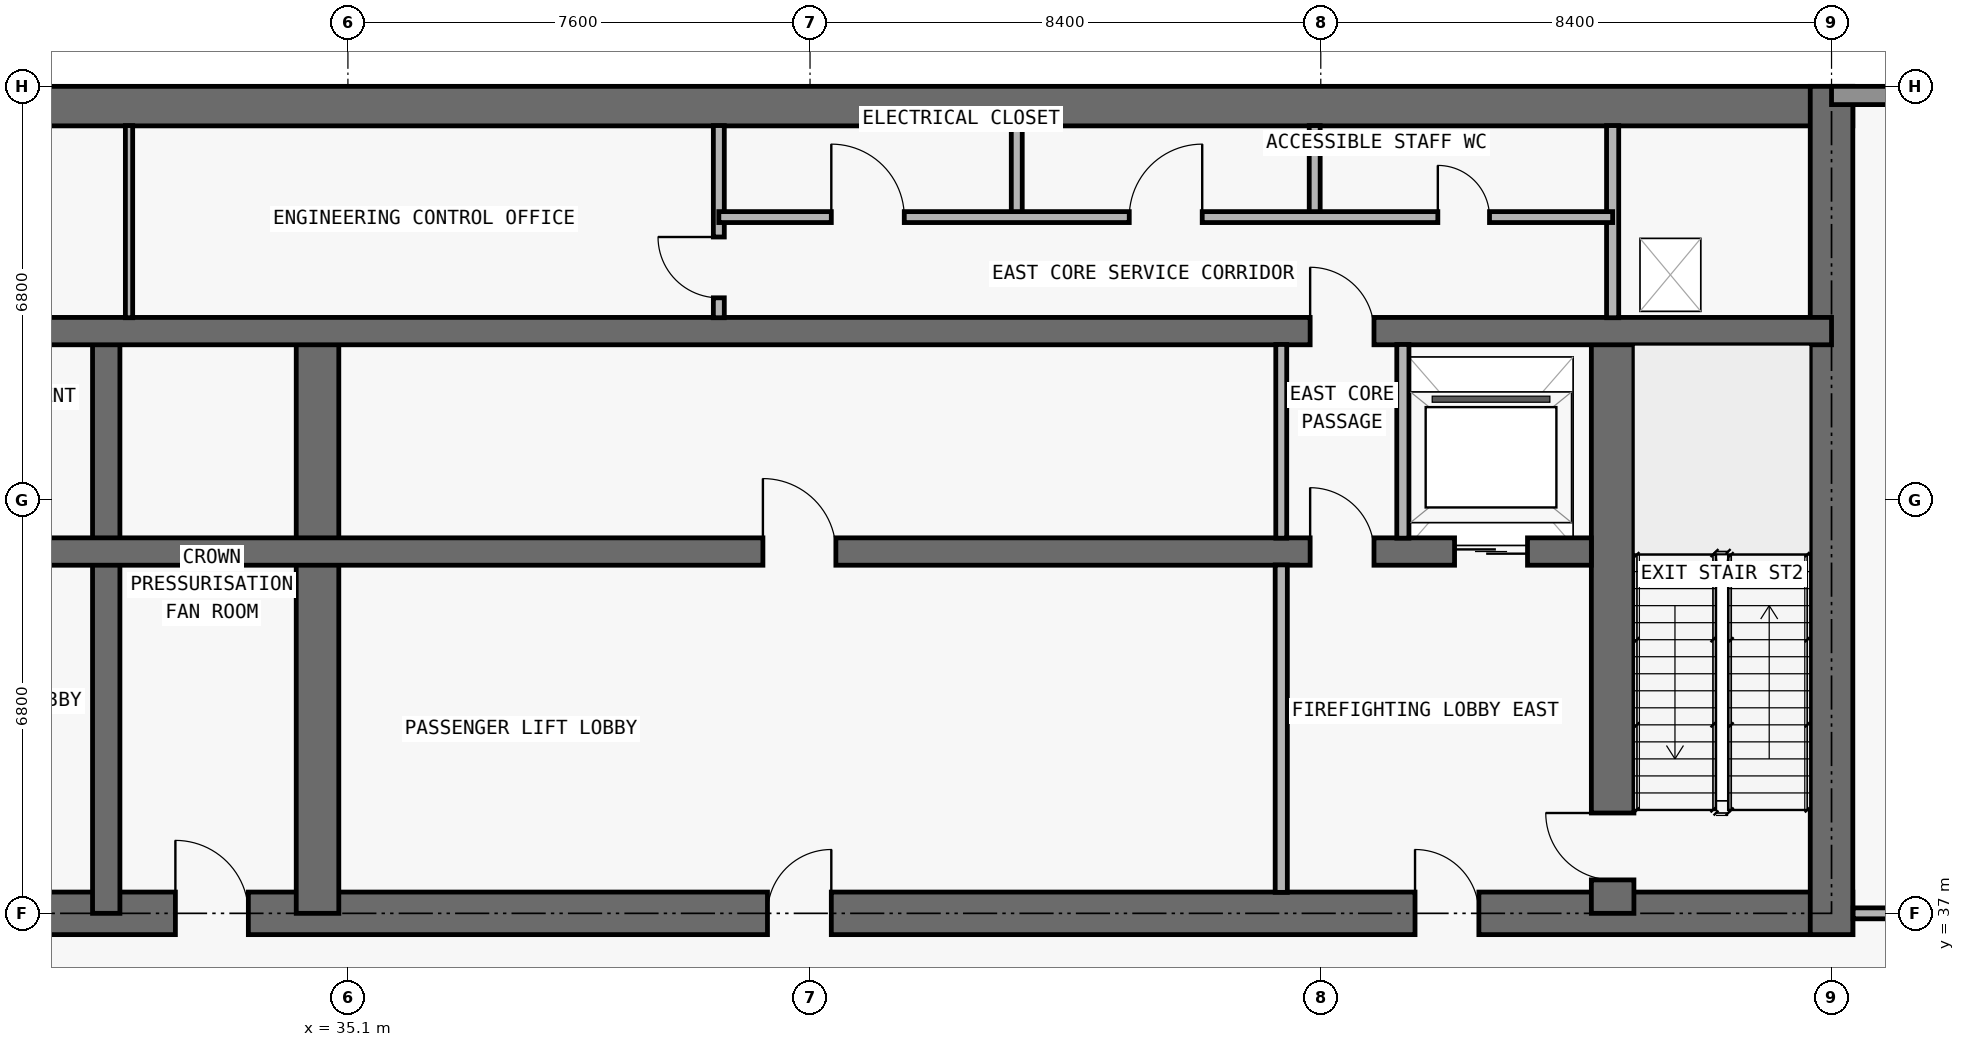
"""IFC4 building model, lengths in metres.
Left out: names, types, materials, properties, quantities, classifications, styles, units other than length and angle.
Written with IfcOpenShell. Run it as: python <this file> out.ifc"""

import sys

from ifc_helpers import new_model, si_unit, direction, frame, frame_2d, origin, place, context, subcontext, project, spatial, rectangle, extrude, element, fill, save


model = new_model("IFC4")
c1 = context("Model", 3, precision=1e-05, world=origin(), true_north=direction((0.0, 1.0)))
c2 = subcontext(c1, "Body", "Model", "MODEL_VIEW")
j1 = project(units=[si_unit("LENGTHUNIT", "METRE"), si_unit("PLANEANGLEUNIT", "RADIAN")], contexts=[c1])
p1 = place(None, origin())
s1 = spatial("IfcSite", under=j1, at=p1, CompositionType="ELEMENT")
p2 = place(p1, origin())
s2 = spatial("IfcBuilding", under=s1, at=p2, CompositionType="ELEMENT")
p3 = place(p2, frame((0.0, 0.0, 290.2)))
s3 = spatial("IfcBuildingStorey", under=s2, at=p3, CompositionType="ELEMENT", Elevation=290.2)
p4 = place(p3, frame((17.95, 37.0, 0.0), z_axis=(0.0, 0.0, 1.0), x_axis=(1.0, 0.0, 0.0)))
e1 = element("IfcWall", 1, at=p4, inside=s3, PredefinedType="SHEAR", context=c2, shape_type="SweptSolid", body=[
    extrude(rectangle(XDim=41.9, YDim=0.7, at=frame_2d((20.95, 0.0))), origin(), (0.0, 0.0, 1.0), 5.1),
])
p5 = place(p4, frame((14.312, 0.0, 0.0)))
e2 = element("IfcOpeningElement", 2, at=p5, cuts=e1, PredefinedType="OPENING", context=c2, shape_type="SweptSolid", body=[
    extrude(rectangle(XDim=1.2, YDim=2.2, at=frame_2d((0.6, 1.1))), frame((0.0, 0.36, 0.0), z_axis=(0.0, -1.0, 0.0), x_axis=(1.0, 0.0, 0.0)), (0.0, 0.0, 1.0), 0.72),
])
p6 = place(p4, frame((6.2, 0.0, 0.0)))
e3 = element("IfcOpeningElement", 3, at=p6, cuts=e1, PredefinedType="OPENING", context=c2, shape_type="SweptSolid", body=[
    extrude(rectangle(XDim=1.05, YDim=2.15, at=frame_2d((0.525, 1.075))), frame((0.0, 0.36, 0.0), z_axis=(0.0, -1.0, 0.0), x_axis=(1.0, 0.0, 0.0)), (0.0, 0.0, 1.0), 0.72),
])
p7 = place(p4, frame((34.7, 0.0, 0.0)))
e4 = element("IfcOpeningElement", 4, at=p7, cuts=e1, PredefinedType="OPENING", context=c2, shape_type="SweptSolid", body=[
    extrude(rectangle(XDim=1.05, YDim=2.15, at=frame_2d((0.525, 1.075))), frame((0.0, 0.36, 0.0), z_axis=(0.0, -1.0, 0.0), x_axis=(1.0, 0.0, 0.0)), (0.0, 0.0, 1.0), 0.72),
])
p8 = place(p4, frame((10.812, 0.0, 0.0)))
e5 = element("IfcOpeningElement", 5, at=p8, cuts=e1, PredefinedType="OPENING", context=c2, shape_type="SweptSolid", body=[
    extrude(rectangle(XDim=1.05, YDim=2.15, at=frame_2d((0.525, 1.075))), frame((0.0, 0.36, 0.0), z_axis=(0.0, -1.0, 0.0), x_axis=(1.0, 0.0, 0.0)), (0.0, 0.0, 1.0), 0.72),
])
p9 = place(p4, frame((24.05, 0.0, 0.0)))
e6 = element("IfcOpeningElement", 6, at=p9, cuts=e1, PredefinedType="OPENING", context=c2, shape_type="SweptSolid", body=[
    extrude(rectangle(XDim=1.05, YDim=2.15, at=frame_2d((0.525, 1.075))), frame((0.0, 0.36, 0.0), z_axis=(0.0, -1.0, 0.0), x_axis=(1.0, 0.0, 0.0)), (0.0, 0.0, 1.0), 0.72),
])
p10 = place(p3, frame((17.95, 50.275, 0.0), z_axis=(0.0, 0.0, 1.0), x_axis=(1.0, 0.0, 0.0)))
e7 = element("IfcWall", 7, at=p10, inside=s3, PredefinedType="SHEAR", context=c2, shape_type="SweptSolid", body=[
    extrude(rectangle(XDim=41.9, YDim=0.65, at=frame_2d((20.95, 0.0))), origin(), (0.0, 0.0, 1.0), 5.1),
])
p11 = place(p3, frame((59.5, 36.65, 0.0), z_axis=(0.0, 0.0, 1.0), x_axis=(0.0, 1.0, 0.0)))
e8 = element("IfcWall", 8, at=p11, inside=s3, PredefinedType="SHEAR", context=c2, shape_type="SweptSolid", body=[
    extrude(rectangle(XDim=13.95, YDim=0.7, at=frame_2d((6.975, 0.0))), origin(), (0.0, 0.0, 1.0), 5.1),
])
p12 = place(p3, frame((55.9, 37.0, 0.0), z_axis=(0.0, 0.0, 1.0), x_axis=(0.0, 1.0, 0.0)))
e9 = element("IfcWall", 9, at=p12, inside=s3, PredefinedType="SHEAR", context=c2, shape_type="SweptSolid", body=[
    extrude(rectangle(XDim=9.575, YDim=0.7, at=frame_2d((4.788, 0.0))), origin(), (0.0, 0.0, 1.0), 5.1),
])
p13 = place(p12, frame((0.55, 0.0, 0.0)))
e10 = element("IfcOpeningElement", 10, at=p13, cuts=e9, PredefinedType="OPENING", context=c2, shape_type="SweptSolid", body=[
    extrude(rectangle(XDim=1.1, YDim=2.15, at=frame_2d((0.55, 1.075))), frame((0.0, 0.36, 0.0), z_axis=(0.0, -1.0, 0.0), x_axis=(1.0, 0.0, 0.0)), (0.0, 0.0, 1.0), 0.72),
])
p14 = place(p3, frame((31.125, 37.0, 0.0), z_axis=(0.0, 0.0, 1.0), x_axis=(0.0, 1.0, 0.0)))
e11 = element("IfcWall", 11, at=p14, inside=s3, PredefinedType="SHEAR", context=c2, shape_type="SweptSolid", body=[
    extrude(rectangle(XDim=9.575, YDim=0.45, at=frame_2d((4.788, 0.0))), origin(), (0.0, 0.0, 1.0), 5.1),
])
p15 = place(p3, frame((34.6, 37.0, 0.0), z_axis=(0.0, 0.0, 1.0), x_axis=(0.0, 1.0, 0.0)))
e12 = element("IfcWall", 12, at=p15, inside=s3, PredefinedType="SHEAR", context=c2, shape_type="SweptSolid", body=[
    extrude(rectangle(XDim=9.575, YDim=0.7, at=frame_2d((4.788, 0.0))), origin(), (0.0, 0.0, 1.0), 5.1),
])
p16 = place(p3, frame((22.25, 42.95, 0.0), z_axis=(0.0, 0.0, 1.0), x_axis=(1.0, 0.0, 0.0)))
e13 = element("IfcWall", 13, at=p16, inside=s3, PredefinedType="SHEAR", context=c2, shape_type="SweptSolid", body=[
    extrude(rectangle(XDim=33.3, YDim=0.45, at=frame_2d((16.65, 0.0))), origin(), (0.0, 0.0, 1.0), 5.1),
])
p17 = place(p16, frame((1.05, 0.0, 0.0)))
e14 = element("IfcOpeningElement", 14, at=p17, cuts=e13, PredefinedType="OPENING", context=c2, shape_type="SweptSolid", body=[
    extrude(rectangle(XDim=1.2, YDim=2.2, at=frame_2d((0.6, 1.1))), frame((0.0, 0.235, 0.0), z_axis=(0.0, -1.0, 0.0), x_axis=(1.0, 0.0, 0.0)), (0.0, 0.0, 1.0), 0.47),
])
p18 = place(p16, frame((31.05, 0.0, 0.0)))
e15 = element("IfcOpeningElement", 15, at=p18, cuts=e13, PredefinedType="OPENING", context=c2, shape_type="SweptSolid", body=[
    extrude(rectangle(XDim=1.2, YDim=2.2, at=frame_2d((0.6, 1.1))), frame((0.0, 0.235, 0.0), z_axis=(0.0, -1.0, 0.0), x_axis=(1.0, 0.0, 0.0)), (0.0, 0.0, 1.0), 0.47),
])
p19 = place(p16, frame((3.625, 0.0, 0.0)))
e16 = element("IfcOpeningElement", 16, at=p19, cuts=e13, PredefinedType="OPENING", context=c2, shape_type="SweptSolid", body=[
    extrude(rectangle(XDim=1.05, YDim=2.15, at=frame_2d((0.525, 1.075))), frame((0.0, 0.235, 0.0), z_axis=(0.0, -1.0, 0.0), x_axis=(1.0, 0.0, 0.0)), (0.0, 0.0, 1.0), 0.47),
])
p20 = place(p16, frame((28.675, 0.0, 0.0)))
e17 = element("IfcOpeningElement", 17, at=p20, cuts=e13, PredefinedType="OPENING", context=c2, shape_type="SweptSolid", body=[
    extrude(rectangle(XDim=1.05, YDim=2.15, at=frame_2d((0.525, 1.075))), frame((0.0, 0.235, 0.0), z_axis=(0.0, -1.0, 0.0), x_axis=(1.0, 0.0, 0.0)), (0.0, 0.0, 1.0), 0.47),
])
p21 = place(p16, frame((6.538, 0.0, 0.0)))
e18 = element("IfcOpeningElement", 18, at=p21, cuts=e13, PredefinedType="OPENING", context=c2, shape_type="SweptSolid", body=[
    extrude(rectangle(XDim=1.0, YDim=2.2, at=frame_2d((0.5, 1.1))), frame((0.0, 0.235, 0.0), z_axis=(0.0, -1.0, 0.0), x_axis=(1.0, 0.0, 0.0)), (0.0, 0.0, 1.0), 0.47),
])
p22 = place(p16, frame((19.675, 0.0, 0.0)))
e19 = element("IfcOpeningElement", 19, at=p22, cuts=e13, PredefinedType="OPENING", context=c2, shape_type="SweptSolid", body=[
    extrude(rectangle(XDim=1.2, YDim=2.2, at=frame_2d((0.6, 1.1))), frame((0.0, 0.235, 0.0), z_axis=(0.0, -1.0, 0.0), x_axis=(1.0, 0.0, 0.0)), (0.0, 0.0, 1.0), 0.47),
])
p23 = place(p3, frame((18.3, 46.575, 0.0), z_axis=(0.0, 0.0, 1.0), x_axis=(1.0, 0.0, 0.0)))
e20 = element("IfcWall", 20, at=p23, inside=s3, PredefinedType="SHEAR", context=c2, shape_type="SweptSolid", body=[
    extrude(rectangle(XDim=41.2, YDim=0.45, at=frame_2d((20.6, 0.0))), origin(), (0.0, 0.0, 1.0), 5.1),
])
p24 = place(p23, frame((7.6, 0.0, 0.0)))
e21 = element("IfcOpeningElement", 21, at=p24, cuts=e20, PredefinedType="OPENING", context=c2, shape_type="SweptSolid", body=[
    extrude(rectangle(XDim=1.0, YDim=2.2, at=frame_2d((0.5, 1.1))), frame((0.0, 0.235, 0.0), z_axis=(0.0, -1.0, 0.0), x_axis=(1.0, 0.0, 0.0)), (0.0, 0.0, 1.0), 0.47),
])
p25 = place(p23, frame((32.625, 0.0, 0.0)))
e22 = element("IfcOpeningElement", 22, at=p25, cuts=e20, PredefinedType="OPENING", context=c2, shape_type="SweptSolid", body=[
    extrude(rectangle(XDim=1.05, YDim=2.15, at=frame_2d((0.525, 1.075))), frame((0.0, 0.235, 0.0), z_axis=(0.0, -1.0, 0.0), x_axis=(1.0, 0.0, 0.0)), (0.0, 0.0, 1.0), 0.47),
])
p26 = place(p3, frame((59.5, 50.45, 0.0), z_axis=(0.0, 0.0, 1.0), x_axis=(1.0, 0.0, 0.0)))
e23 = element("IfcWall", 23, at=p26, inside=s3, PredefinedType="STANDARD", context=c2, shape_type="SweptSolid", body=[
    extrude(rectangle(XDim=1.8, YDim=0.3, at=frame_2d((0.9, 0.0))), origin(), (0.0, 0.0, 1.0), 5.1),
])
p27 = place(p3, frame((31.5, 46.795, 0.0), z_axis=(0.0, 0.0, 1.0), x_axis=(0.0, 1.0, 0.0)))
e24 = element("IfcWall", 24, at=p27, inside=s3, PredefinedType="PARTITIONING", context=c2, shape_type="SweptSolid", body=[
    extrude(rectangle(XDim=3.16, YDim=0.12, at=frame_2d((1.58, 0.0))), origin(), (0.0, 0.0, 1.0), 5.1),
])
p28 = place(p3, frame((41.2, 46.795, 0.0), z_axis=(0.0, 0.0, 1.0), x_axis=(0.0, 1.0, 0.0)))
e25 = element("IfcWall", 25, at=p28, inside=s3, PredefinedType="PARTITIONING", context=c2, shape_type="SweptSolid", body=[
    extrude(rectangle(XDim=3.16, YDim=0.18, at=frame_2d((1.58, 0.0))), origin(), (0.0, 0.0, 1.0), 5.1),
])
p29 = place(p28, frame((0.327, 0.0, 0.0)))
e26 = element("IfcOpeningElement", 26, at=p29, cuts=e25, PredefinedType="OPENING", context=c2, shape_type="SweptSolid", body=[
    extrude(rectangle(XDim=1.0, YDim=2.2, at=frame_2d((0.5, 1.1))), frame((0.0, 0.1, 0.0), z_axis=(0.0, -1.0, 0.0), x_axis=(1.0, 0.0, 0.0)), (0.0, 0.0, 1.0), 0.2),
])
p30 = place(p3, frame((46.1, 48.45, 0.0), z_axis=(0.0, 0.0, 1.0), x_axis=(0.0, 1.0, 0.0)))
e27 = element("IfcWall", 27, at=p30, inside=s3, PredefinedType="PARTITIONING", context=c2, shape_type="SweptSolid", body=[
    extrude(rectangle(XDim=1.505, YDim=0.18, at=frame_2d((0.752, 0.0))), origin(), (0.0, 0.0, 1.0), 5.1),
])
p31 = place(p3, frame((50.45, 37.345, 0.0), z_axis=(0.0, 0.0, 1.0), x_axis=(0.0, 1.0, 0.0)))
e28 = element("IfcWall", 28, at=p31, inside=s3, PredefinedType="PARTITIONING", context=c2, shape_type="SweptSolid", body=[
    extrude(rectangle(XDim=5.385, YDim=0.2, at=frame_2d((2.692, 0.0))), origin(), (0.0, 0.0, 1.0), 5.1),
])
p32 = place(p3, frame((50.45, 43.17, 0.0), z_axis=(0.0, 0.0, 1.0), x_axis=(0.0, 1.0, 0.0)))
e29 = element("IfcWall", 29, at=p32, inside=s3, PredefinedType="PARTITIONING", context=c2, shape_type="SweptSolid", body=[
    extrude(rectangle(XDim=3.185, YDim=0.18, at=frame_2d((1.593, 0.0))), origin(), (0.0, 0.0, 1.0), 5.1),
])
p33 = place(p3, frame((51.0, 48.45, 0.0), z_axis=(0.0, 0.0, 1.0), x_axis=(0.0, 1.0, 0.0)))
e30 = element("IfcWall", 30, at=p33, inside=s3, PredefinedType="PARTITIONING", context=c2, shape_type="SweptSolid", body=[
    extrude(rectangle(XDim=1.505, YDim=0.18, at=frame_2d((0.752, 0.0))), origin(), (0.0, 0.0, 1.0), 5.1),
])
p34 = place(p3, frame((52.45, 43.17, 0.0), z_axis=(0.0, 0.0, 1.0), x_axis=(0.0, 1.0, 0.0)))
e31 = element("IfcWall", 31, at=p34, inside=s3, PredefinedType="PARTITIONING", context=c2, shape_type="SweptSolid", body=[
    extrude(rectangle(XDim=3.185, YDim=0.2, at=frame_2d((1.593, 0.0))), origin(), (0.0, 0.0, 1.0), 5.1),
])
p35 = place(p3, frame((55.9, 46.795, 0.0), z_axis=(0.0, 0.0, 1.0), x_axis=(0.0, 1.0, 0.0)))
e32 = element("IfcWall", 32, at=p35, inside=s3, PredefinedType="PARTITIONING", context=c2, shape_type="SweptSolid", body=[
    extrude(rectangle(XDim=3.16, YDim=0.2, at=frame_2d((1.58, 0.0))), origin(), (0.0, 0.0, 1.0), 5.1),
])
p36 = place(p3, frame((59.855, 37.0, 0.0), z_axis=(0.0, 0.0, 1.0), x_axis=(1.0, 0.0, 0.0)))
e33 = element("IfcWall", 33, at=p36, inside=s3, PredefinedType="PARTITIONING", context=c2, shape_type="SweptSolid", body=[
    extrude(rectangle(XDim=1.445, YDim=0.18, at=frame_2d((0.723, 0.0))), origin(), (0.0, 0.0, 1.0), 5.1),
])
p37 = place(p3, frame((41.2, 48.45, 0.0), z_axis=(0.0, 0.0, 1.0), x_axis=(1.0, 0.0, 0.0)))
e34 = element("IfcWall", 34, at=p37, inside=s3, PredefinedType="PARTITIONING", context=c2, shape_type="SweptSolid", body=[
    extrude(rectangle(XDim=14.7, YDim=0.18, at=frame_2d((7.35, 0.0))), origin(), (0.0, 0.0, 1.0), 5.1),
])
p38 = place(p37, frame((1.85, 0.0, 0.0)))
e35 = element("IfcOpeningElement", 35, at=p38, cuts=e34, PredefinedType="OPENING", context=c2, shape_type="SweptSolid", body=[
    extrude(rectangle(XDim=1.2, YDim=2.2, at=frame_2d((0.6, 1.1))), frame((0.0, 0.1, 0.0), z_axis=(0.0, -1.0, 0.0), x_axis=(1.0, 0.0, 0.0)), (0.0, 0.0, 1.0), 0.2),
])
p39 = place(p37, frame((6.75, 0.0, 0.0)))
e36 = element("IfcOpeningElement", 36, at=p39, cuts=e34, PredefinedType="OPENING", context=c2, shape_type="SweptSolid", body=[
    extrude(rectangle(XDim=1.2, YDim=2.2, at=frame_2d((0.6, 1.1))), frame((0.0, 0.1, 0.0), z_axis=(0.0, -1.0, 0.0), x_axis=(1.0, 0.0, 0.0)), (0.0, 0.0, 1.0), 0.2),
])
p40 = place(p37, frame((11.825, 0.0, 0.0)))
e37 = element("IfcOpeningElement", 37, at=p40, cuts=e34, PredefinedType="OPENING", context=c2, shape_type="SweptSolid", body=[
    extrude(rectangle(XDim=0.85, YDim=2.1, at=frame_2d((0.425, 1.05))), frame((0.0, 0.1, 0.0), z_axis=(0.0, -1.0, 0.0), x_axis=(1.0, 0.0, 0.0)), (0.0, 0.0, 1.0), 0.2),
])
p41 = place(p18, origin())
e38 = element("IfcDoor", 38, at=p41, inside=s3, OperationType="DOUBLE_DOOR_SLIDING", PredefinedType="DOOR", context=c2, shape_type="SweptSolid", body=[
    extrude(rectangle(XDim=1.2, YDim=2.2, at=frame_2d((0.6, 1.1))), frame((0.0, 0.025, 0.0), z_axis=(0.0, -1.0, 0.0), x_axis=(1.0, 0.0, 0.0)), (0.0, 0.0, 1.0), 0.05),
])
fill(e15, e38)
p42 = place(p5, origin())
e39 = element("IfcDoor", 39, at=p42, inside=s3, OperationType="SINGLE_SWING_LEFT", PredefinedType="DOOR", context=c2, shape_type="SweptSolid", body=[
    extrude(rectangle(XDim=1.2, YDim=2.2, at=frame_2d((0.6, 1.1))), frame((0.0, 0.025, 0.0), z_axis=(0.0, -1.0, 0.0), x_axis=(1.0, 0.0, 0.0)), (0.0, 0.0, 1.0), 0.05),
])
fill(e2, e39)
p43 = place(p7, origin())
e40 = element("IfcDoor", 40, at=p43, inside=s3, OperationType="SINGLE_SWING_LEFT", PredefinedType="DOOR", context=c2, shape_type="SweptSolid", body=[
    extrude(rectangle(XDim=1.05, YDim=2.15, at=frame_2d((0.525, 1.075))), frame((0.0, 0.025, 0.0), z_axis=(0.0, -1.0, 0.0), x_axis=(1.0, 0.0, 0.0)), (0.0, 0.0, 1.0), 0.05),
])
fill(e4, e40)
p44 = place(p13, origin())
e41 = element("IfcDoor", 41, at=p44, inside=s3, OperationType="SINGLE_SWING_RIGHT", PredefinedType="DOOR", context=c2, shape_type="SweptSolid", body=[
    extrude(rectangle(XDim=1.1, YDim=2.15, at=frame_2d((0.55, 1.075))), frame((0.0, 0.025, 0.0), z_axis=(0.0, -1.0, 0.0), x_axis=(1.0, 0.0, 0.0)), (0.0, 0.0, 1.0), 0.05),
])
fill(e10, e41)
p45 = place(p20, origin())
e42 = element("IfcDoor", 42, at=p45, inside=s3, OperationType="SINGLE_SWING_LEFT", PredefinedType="DOOR", context=c2, shape_type="SweptSolid", body=[
    extrude(rectangle(XDim=1.05, YDim=2.15, at=frame_2d((0.525, 1.075))), frame((0.0, 0.025, 0.0), z_axis=(0.0, -1.0, 0.0), x_axis=(1.0, 0.0, 0.0)), (0.0, 0.0, 1.0), 0.05),
])
fill(e17, e42)
p46 = place(p9, origin())
e43 = element("IfcDoor", 43, at=p46, inside=s3, OperationType="SINGLE_SWING_RIGHT", PredefinedType="DOOR", context=c2, shape_type="SweptSolid", body=[
    extrude(rectangle(XDim=1.05, YDim=2.15, at=frame_2d((0.525, 1.075))), frame((0.0, 0.025, 0.0), z_axis=(0.0, -1.0, 0.0), x_axis=(1.0, 0.0, 0.0)), (0.0, 0.0, 1.0), 0.05),
])
fill(e6, e43)
p47 = place(p22, origin())
e44 = element("IfcDoor", 44, at=p47, inside=s3, OperationType="SINGLE_SWING_LEFT", PredefinedType="DOOR", context=c2, shape_type="SweptSolid", body=[
    extrude(rectangle(XDim=1.2, YDim=2.2, at=frame_2d((0.6, 1.1))), frame((0.0, 0.025, 0.0), z_axis=(0.0, -1.0, 0.0), x_axis=(1.0, 0.0, 0.0)), (0.0, 0.0, 1.0), 0.05),
])
fill(e19, e44)
p48 = place(p25, origin())
e45 = element("IfcDoor", 45, at=p48, inside=s3, OperationType="SINGLE_SWING_LEFT", PredefinedType="DOOR", context=c2, shape_type="SweptSolid", body=[
    extrude(rectangle(XDim=1.05, YDim=2.15, at=frame_2d((0.525, 1.075))), frame((0.0, 0.025, 0.0), z_axis=(0.0, -1.0, 0.0), x_axis=(1.0, 0.0, 0.0)), (0.0, 0.0, 1.0), 0.05),
])
fill(e22, e45)
p49 = place(p29, origin())
e46 = element("IfcDoor", 46, at=p49, inside=s3, OperationType="SINGLE_SWING_RIGHT", PredefinedType="DOOR", context=c2, shape_type="SweptSolid", body=[
    extrude(rectangle(XDim=1.0, YDim=2.2, at=frame_2d((0.5, 1.1))), frame((0.0, 0.025, 0.0), z_axis=(0.0, -1.0, 0.0), x_axis=(1.0, 0.0, 0.0)), (0.0, 0.0, 1.0), 0.05),
])
fill(e26, e46)
p50 = place(p38, origin())
e47 = element("IfcDoor", 47, at=p50, inside=s3, OperationType="SINGLE_SWING_LEFT", PredefinedType="DOOR", context=c2, shape_type="SweptSolid", body=[
    extrude(rectangle(XDim=1.2, YDim=2.2, at=frame_2d((0.6, 1.1))), frame((0.0, 0.025, 0.0), z_axis=(0.0, -1.0, 0.0), x_axis=(1.0, 0.0, 0.0)), (0.0, 0.0, 1.0), 0.05),
])
fill(e35, e47)
p51 = place(p39, origin())
e48 = element("IfcDoor", 48, at=p51, inside=s3, OperationType="SINGLE_SWING_RIGHT", PredefinedType="DOOR", context=c2, shape_type="SweptSolid", body=[
    extrude(rectangle(XDim=1.2, YDim=2.2, at=frame_2d((0.6, 1.1))), frame((0.0, 0.025, 0.0), z_axis=(0.0, -1.0, 0.0), x_axis=(1.0, 0.0, 0.0)), (0.0, 0.0, 1.0), 0.05),
])
fill(e36, e48)
p52 = place(p40, origin())
e49 = element("IfcDoor", 49, at=p52, inside=s3, OperationType="SINGLE_SWING_LEFT", PredefinedType="DOOR", context=c2, shape_type="SweptSolid", body=[
    extrude(rectangle(XDim=0.85, YDim=2.1, at=frame_2d((0.425, 1.05))), frame((0.0, 0.025, 0.0), z_axis=(0.0, -1.0, 0.0), x_axis=(1.0, 0.0, 0.0)), (0.0, 0.0, 1.0), 0.05),
])
fill(e37, e49)
save(model, sys.argv[1])
